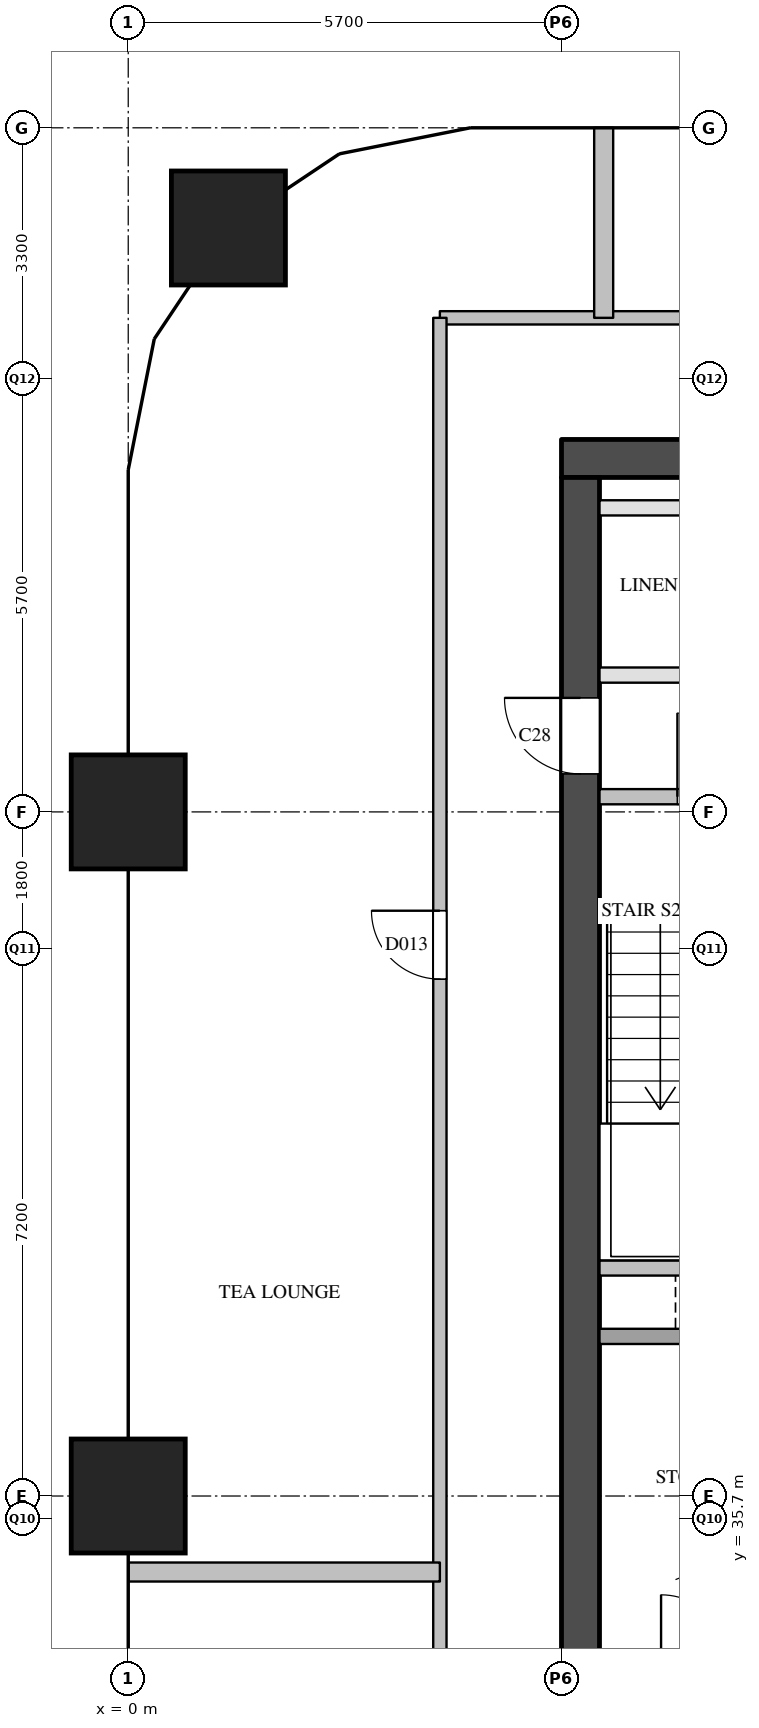
"""IFC4 building model, lengths in metres.
Left out: names, types, materials, properties, quantities, classifications, styles, units other than length and angle.
Written with IfcOpenShell. Run it as: python <this file> out.ifc"""

import sys

from ifc_helpers import new_model, si_unit, direction, frame, frame_2d, origin, origin_2d, place, context, subcontext, project, spatial, rectangle, extrude, element, fill, save


model = new_model("IFC4")
c1 = context("Model", 3, precision=1e-05, world=origin(), true_north=direction((0.0, 1.0)))
c2 = subcontext(c1, "Body", "Model", "MODEL_VIEW")
j1 = project(units=[si_unit("LENGTHUNIT", "METRE"), si_unit("PLANEANGLEUNIT", "RADIAN")], contexts=[c1])
p1 = place(None, origin())
s1 = spatial("IfcSite", under=j1, at=p1, CompositionType="ELEMENT")
p2 = place(p1, origin())
s2 = spatial("IfcBuilding", under=s1, at=p2, CompositionType="ELEMENT")
p3 = place(p2, frame((0.0, 0.0, 142.7)))
s3 = spatial("IfcBuildingStorey", under=s2, at=p3, CompositionType="ELEMENT", Elevation=142.7)
for number, where, z_axis, x_axis in (
    (1, (0.0, 36.0, 0.0), (0.0, 0.0, 1.0), (1.0, 0.0, 0.0)),
    (2, (0.0, 45.0, 0.0), (0.0, 0.0, 1.0), (1.0, 0.0, 0.0)),
    (3, (1.318, 52.682, 0.0), (0.0, 0.0, 1.0), (1.0, 0.0, 0.0)),
):
    element("IfcColumn", number, at=place(p3, frame(where, z_axis=z_axis, x_axis=x_axis)), inside=s3, PredefinedType="COLUMN", context=c2, shape_type="SweptSolid", body=[
        extrude(rectangle(XDim=1.5, YDim=1.5, at=origin_2d()), origin(), (0.0, 0.0, 1.0), 3.9),
    ])
p4 = place(p3, frame((5.7, 49.65, 0.0), z_axis=(0.0, 0.0, 1.0), x_axis=(1.0, 0.0, 0.0)))
e4 = element("IfcWall", 4, at=p4, inside=s3, PredefinedType="SHEAR", context=c2, shape_type="SweptSolid", body=[
    extrude(rectangle(XDim=12.2, YDim=0.5, at=frame_2d((6.1, 0.0))), origin(), (0.0, 0.0, 1.0), 3.6),
])
p5 = place(p3, frame((5.95, 29.1, 0.0), z_axis=(0.0, 0.0, 1.0), x_axis=(0.0, 1.0, 0.0)))
e5 = element("IfcWall", 5, at=p5, inside=s3, PredefinedType="SHEAR", context=c2, shape_type="SweptSolid", body=[
    extrude(rectangle(XDim=20.3, YDim=0.5, at=frame_2d((10.15, 0.0))), origin(), (0.0, 0.0, 1.0), 3.6),
])
p6 = place(p5, frame((3.45, 0.0, 0.0)))
e6 = element("IfcOpeningElement", 6, at=p6, cuts=e5, PredefinedType="OPENING", context=c2, shape_type="SweptSolid", body=[
    extrude(rectangle(XDim=1.0, YDim=2.1, at=frame_2d((0.5, 1.05))), frame((0.0, 0.26, 0.0), z_axis=(0.0, -1.0, 0.0), x_axis=(1.0, 0.0, 0.0)), (0.0, 0.0, 1.0), 0.52),
])
p7 = place(p5, frame((16.4, 0.0, 0.0)))
e7 = element("IfcOpeningElement", 7, at=p7, cuts=e5, PredefinedType="OPENING", context=c2, shape_type="SweptSolid", body=[
    extrude(rectangle(XDim=1.0, YDim=2.1, at=frame_2d((0.5, 1.05))), frame((0.0, 0.26, 0.0), z_axis=(0.0, -1.0, 0.0), x_axis=(1.0, 0.0, 0.0)), (0.0, 0.0, 1.0), 0.52),
])
p8 = place(p3, frame((6.2, 38.1, 0.0), z_axis=(0.0, 0.0, 1.0), x_axis=(1.0, 0.0, 0.0)))
e8 = element("IfcWall", 8, at=p8, inside=s3, PredefinedType="SOLIDWALL", context=c2, shape_type="SweptSolid", body=[
    extrude(rectangle(XDim=11.2, YDim=0.2, at=frame_2d((5.6, 0.0))), origin(), (0.0, 0.0, 1.0), 3.6),
])
p9 = place(p8, frame((8.85, 0.0, 0.0)))
e9 = element("IfcOpeningElement", 9, at=p9, cuts=e8, PredefinedType="OPENING", context=c2, shape_type="SweptSolid", body=[
    extrude(rectangle(XDim=1.2, YDim=2.1, at=frame_2d((0.6, 1.05))), frame((0.0, 0.11, 0.0), z_axis=(0.0, -1.0, 0.0), x_axis=(1.0, 0.0, 0.0)), (0.0, 0.0, 1.0), 0.22),
])
p10 = place(p3, frame((6.2, 39.0, 0.0), z_axis=(0.0, 0.0, 1.0), x_axis=(1.0, 0.0, 0.0)))
e10 = element("IfcWall", 10, at=p10, inside=s3, PredefinedType="SOLIDWALL", context=c2, shape_type="SweptSolid", body=[
    extrude(rectangle(XDim=3.05, YDim=0.2, at=frame_2d((1.525, 0.0))), origin(), (0.0, 0.0, 1.0), 3.6),
])
p11 = place(p3, frame((6.2, 45.2, 0.0), z_axis=(0.0, 0.0, 1.0), x_axis=(1.0, 0.0, 0.0)))
e11 = element("IfcWall", 11, at=p11, inside=s3, PredefinedType="SOLIDWALL", context=c2, shape_type="SweptSolid", body=[
    extrude(rectangle(XDim=6.3, YDim=0.2, at=frame_2d((3.15, 0.0))), origin(), (0.0, 0.0, 1.0), 3.6),
])
p12 = place(p11, frame((1.025, 0.0, 0.0)))
e12 = element("IfcOpeningElement", 12, at=p12, cuts=e11, PredefinedType="OPENING", context=c2, shape_type="SweptSolid", body=[
    extrude(rectangle(XDim=1.1, YDim=2.1, at=frame_2d((0.55, 1.05))), frame((0.0, 0.11, 0.0), z_axis=(0.0, -1.0, 0.0), x_axis=(1.0, 0.0, 0.0)), (0.0, 0.0, 1.0), 0.22),
])
p13 = place(p11, frame((4.175, 0.0, 0.0)))
e13 = element("IfcOpeningElement", 13, at=p13, cuts=e11, PredefinedType="OPENING", context=c2, shape_type="SweptSolid", body=[
    extrude(rectangle(XDim=1.1, YDim=2.1, at=frame_2d((0.55, 1.05))), frame((0.0, 0.11, 0.0), z_axis=(0.0, -1.0, 0.0), x_axis=(1.0, 0.0, 0.0)), (0.0, 0.0, 1.0), 0.22),
])
p14 = place(p3, frame((6.2, 46.8, 0.0), z_axis=(0.0, 0.0, 1.0), x_axis=(1.0, 0.0, 0.0)))
e14 = element("IfcWall", 14, at=p14, inside=s3, PredefinedType="PARTITIONING", context=c2, shape_type="SweptSolid", body=[
    extrude(rectangle(XDim=11.2, YDim=0.2, at=frame_2d((5.6, 0.0))), origin(), (0.0, 0.0, 1.0), 3.6),
])
p15 = place(p14, frame((1.23, 0.0, 0.0)))
e15 = element("IfcOpeningElement", 15, at=p15, cuts=e14, PredefinedType="OPENING", context=c2, shape_type="SweptSolid", body=[
    extrude(rectangle(XDim=0.9, YDim=2.1, at=frame_2d((0.45, 1.05))), frame((0.0, 0.11, 0.0), z_axis=(0.0, -1.0, 0.0), x_axis=(1.0, 0.0, 0.0)), (0.0, 0.0, 1.0), 0.22),
])
p16 = place(p14, frame((6.83, 0.0, 0.0)))
e16 = element("IfcOpeningElement", 16, at=p16, cuts=e14, PredefinedType="OPENING", context=c2, shape_type="SweptSolid", body=[
    extrude(rectangle(XDim=0.9, YDim=2.1, at=frame_2d((0.45, 1.05))), frame((0.0, 0.11, 0.0), z_axis=(0.0, -1.0, 0.0), x_axis=(1.0, 0.0, 0.0)), (0.0, 0.0, 1.0), 0.22),
])
p17 = place(p3, frame((6.2, 49.0, 0.0), z_axis=(0.0, 0.0, 1.0), x_axis=(1.0, 0.0, 0.0)))
e17 = element("IfcWall", 17, at=p17, inside=s3, PredefinedType="PARTITIONING", context=c2, shape_type="SweptSolid", body=[
    extrude(rectangle(XDim=11.2, YDim=0.2, at=frame_2d((5.6, 0.0))), origin(), (0.0, 0.0, 1.0), 3.6),
])
p18 = place(p3, frame((4.1, 51.5, 0.0), z_axis=(0.0, 0.0, 1.0), x_axis=(1.0, 0.0, 0.0)))
e18 = element("IfcWall", 18, at=p18, inside=s3, PredefinedType="PARTITIONING", context=c2, shape_type="SweptSolid", body=[
    extrude(rectangle(XDim=15.4, YDim=0.175, at=frame_2d((7.7, 0.0))), origin(), (0.0, 0.0, 1.0), 3.6),
])
p19 = place(p18, frame((8.327, 0.0, 0.0)))
e19 = element("IfcOpeningElement", 19, at=p19, cuts=e18, PredefinedType="OPENING", context=c2, shape_type="SweptSolid", body=[
    extrude(rectangle(XDim=0.9, YDim=2.1, at=frame_2d((0.45, 1.05))), frame((0.0, 0.097, 0.0), z_axis=(0.0, -1.0, 0.0), x_axis=(1.0, 0.0, 0.0)), (0.0, 0.0, 1.0), 0.195),
])
p20 = place(p3, frame((4.1, 28.5, 0.0), z_axis=(0.0, 0.0, 1.0), x_axis=(0.0, 1.0, 0.0)))
e20 = element("IfcWall", 20, at=p20, inside=s3, PredefinedType="PARTITIONING", context=c2, shape_type="SweptSolid", body=[
    extrude(rectangle(XDim=23.0, YDim=0.175, at=frame_2d((11.5, 0.0))), origin(), (0.0, 0.0, 1.0), 3.6),
])
p21 = place(p20, frame((2.8, 0.0, 0.0)))
e21 = element("IfcOpeningElement", 21, at=p21, cuts=e20, PredefinedType="OPENING", context=c2, shape_type="SweptSolid", body=[
    extrude(rectangle(XDim=0.9, YDim=2.1, at=frame_2d((0.45, 1.05))), frame((0.0, 0.097, 0.0), z_axis=(0.0, -1.0, 0.0), x_axis=(1.0, 0.0, 0.0)), (0.0, 0.0, 1.0), 0.195),
])
p22 = place(p20, frame((14.3, 0.0, 0.0)))
e22 = element("IfcOpeningElement", 22, at=p22, cuts=e20, PredefinedType="OPENING", context=c2, shape_type="SweptSolid", body=[
    extrude(rectangle(XDim=0.9, YDim=2.1, at=frame_2d((0.45, 1.05))), frame((0.0, 0.097, 0.0), z_axis=(0.0, -1.0, 0.0), x_axis=(1.0, 0.0, 0.0)), (0.0, 0.0, 1.0), 0.195),
])
p23 = place(p3, frame((0.0, 35.0, 0.0), z_axis=(0.0, 0.0, 1.0), x_axis=(1.0, 0.0, 0.0)))
e23 = element("IfcWall", 23, at=p23, inside=s3, PredefinedType="PARTITIONING", context=c2, shape_type="SweptSolid", body=[
    extrude(rectangle(XDim=4.1, YDim=0.25, at=frame_2d((2.05, 0.0))), origin(), (0.0, 0.0, 1.0), 2.6),
])
p24 = place(p3, frame((6.255, 51.5, 0.0), z_axis=(0.0, 0.0, 1.0), x_axis=(0.0, 1.0, 0.0)))
e24 = element("IfcWall", 24, at=p24, inside=s3, PredefinedType="PARTITIONING", context=c2, shape_type="SweptSolid", body=[
    extrude(rectangle(XDim=2.5, YDim=0.25, at=frame_2d((1.25, 0.0))), origin(), (0.0, 0.0, 1.0), 2.6),
])
p25 = place(p12, origin())
e25 = element("IfcDoor", 25, at=p25, inside=s3, OperationType="SINGLE_SWING_LEFT", PredefinedType="DOOR", context=c2, shape_type="SweptSolid", body=[
    extrude(rectangle(XDim=1.1, YDim=2.1, at=frame_2d((0.55, 1.05))), frame((0.0, 0.025, 0.0), z_axis=(0.0, -1.0, 0.0), x_axis=(1.0, 0.0, 0.0)), (0.0, 0.0, 1.0), 0.05),
])
fill(e12, e25)
p26 = place(p7, origin())
e26 = element("IfcDoor", 26, at=p26, inside=s3, OperationType="SINGLE_SWING_RIGHT", PredefinedType="DOOR", context=c2, shape_type="SweptSolid", body=[
    extrude(rectangle(XDim=1.0, YDim=2.1, at=frame_2d((0.5, 1.05))), frame((0.0, 0.025, 0.0), z_axis=(0.0, -1.0, 0.0), x_axis=(1.0, 0.0, 0.0)), (0.0, 0.0, 1.0), 0.05),
])
fill(e7, e26)
p27 = place(p22, origin())
e27 = element("IfcDoor", 27, at=p27, inside=s3, OperationType="SINGLE_SWING_RIGHT", PredefinedType="DOOR", context=c2, shape_type="SweptSolid", body=[
    extrude(rectangle(XDim=0.9, YDim=2.1, at=frame_2d((0.45, 1.05))), frame((0.0, 0.025, 0.0), z_axis=(0.0, -1.0, 0.0), x_axis=(1.0, 0.0, 0.0)), (0.0, 0.0, 1.0), 0.05),
])
fill(e22, e27)
save(model, sys.argv[1])
